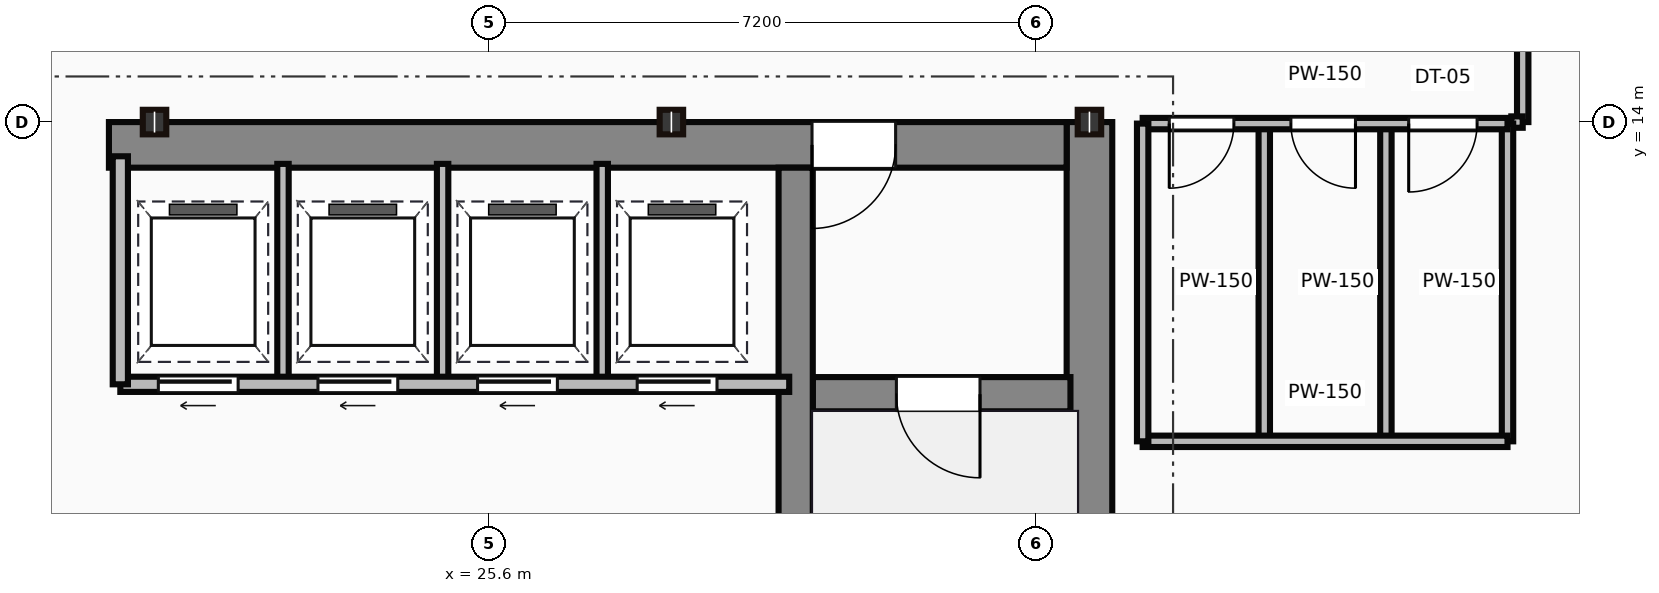
"""IFC4 building model, lengths in metres.
Left out: names, types, materials, properties, quantities, classifications, styles, units other than length and angle.
Written with IfcOpenShell. Run it as: python <this file> out.ifc"""

import sys

from ifc_helpers import new_model, si_unit, direction, frame, frame_2d, origin, origin_2d, place, context, subcontext, project, spatial, rectangle, i_section, extrude, source, transform, mapped, element, fill, save


model = new_model("IFC4")
c1 = context("Model", 3, precision=1e-05, world=origin(), true_north=direction((0.0, 1.0)))
c2 = subcontext(c1, "Body", "Model", "MODEL_VIEW")
j1 = project(units=[si_unit("LENGTHUNIT", "METRE"), si_unit("PLANEANGLEUNIT", "RADIAN")], contexts=[c1])
p1 = place(None, origin())
s1 = spatial("IfcSite", under=j1, at=p1, CompositionType="ELEMENT")
p2 = place(p1, origin())
s2 = spatial("IfcBuilding", under=s1, at=p2, CompositionType="ELEMENT")
p3 = place(p2, frame((0.0, 0.0, 206.85)))
s3 = spatial("IfcBuildingStorey", under=s2, at=p3, CompositionType="ELEMENT", Elevation=206.85)
m1 = source(origin(), c2, "Body", "SweptSolid", [
    extrude(rectangle(XDim=13.1, YDim=0.6, at=frame_2d((6.55, 0.0))), origin(), (0.0, 0.0, 1.0), 3.65),
])
p4 = place(p3, frame((33.5, 0.9, 0.0), z_axis=(0.0, 0.0, 1.0), x_axis=(0.0, 1.0, 0.0)))
e1 = element("IfcWall", 1, at=p4, inside=s3, PredefinedType="SHEAR", context=c2, shape_type="MappedRepresentation", body=[
    mapped(m1, transform((0.0, 0.0, 0.0))),
])
m2 = source(origin(), c2, "Body", "SweptSolid", [
    extrude(rectangle(XDim=12.6, YDim=0.6, at=frame_2d((6.3, 0.0))), origin(), (0.0, 0.0, 1.0), 3.65),
])
p5 = place(p3, frame((20.6, 13.7, 0.0), z_axis=(0.0, 0.0, 1.0), x_axis=(1.0, 0.0, 0.0)))
e2 = element("IfcWall", 2, at=p5, inside=s3, PredefinedType="SHEAR", context=c2, shape_type="MappedRepresentation", body=[
    mapped(m2, transform((0.0, 0.0, 0.0))),
])
p6 = place(p5, frame((9.25, 0.0, 0.0)))
e3 = element("IfcOpeningElement", 3, at=p6, cuts=e2, PredefinedType="OPENING", context=c2, shape_type="SweptSolid", body=[
    extrude(rectangle(XDim=1.1, YDim=2.15, at=frame_2d((0.55, 1.075))), frame((0.0, 0.31, 0.0), z_axis=(0.0, -1.0, 0.0), x_axis=(1.0, 0.0, 0.0)), (0.0, 0.0, 1.0), 0.62),
])
m3 = source(origin(), c2, "Body", "SweptSolid", [
    extrude(rectangle(XDim=12.5, YDim=0.45, at=frame_2d((6.25, 0.0))), origin(), (0.0, 0.0, 1.0), 3.65),
])
p7 = place(p3, frame((29.635, 0.9, 0.0), z_axis=(0.0, 0.0, 1.0), x_axis=(0.0, 1.0, 0.0)))
e4 = element("IfcWall", 4, at=p7, inside=s3, PredefinedType="SHEAR", context=c2, shape_type="MappedRepresentation", body=[
    mapped(m3, transform((0.0, 0.0, 0.0))),
])
m4 = source(origin(), c2, "Body", "SweptSolid", [
    extrude(rectangle(XDim=3.39, YDim=0.45, at=frame_2d((1.695, 0.0))), origin(), (0.0, 0.0, 1.0), 3.65),
])
p8 = place(p3, frame((29.86, 10.42, 0.0), z_axis=(0.0, 0.0, 1.0), x_axis=(1.0, 0.0, 0.0)))
e5 = element("IfcWall", 5, at=p8, inside=s3, PredefinedType="SHEAR", context=c2, shape_type="MappedRepresentation", body=[
    mapped(m4, transform((0.0, 0.0, 0.0))),
])
p9 = place(p8, frame((1.1, 0.0, 0.0)))
e6 = element("IfcOpeningElement", 6, at=p9, cuts=e5, PredefinedType="OPENING", context=c2, shape_type="SweptSolid", body=[
    extrude(rectangle(XDim=1.1, YDim=2.15, at=frame_2d((0.55, 1.075))), frame((0.0, 0.235, 0.0), z_axis=(0.0, -1.0, 0.0), x_axis=(1.0, 0.0, 0.0)), (0.0, 0.0, 1.0), 0.47),
])
m5 = source(origin(), c2, "Body", "SweptSolid", [
    extrude(i_section(OverallWidth=0.309, OverallDepth=0.323, WebThickness=0.014, FlangeThickness=0.023, at=origin_2d()), origin(), (0.0, 0.0, 1.0), 3.65),
])
for number, where, z_axis, x_axis in (
    (7, (21.2, 14.0, 0.0), (0.0, 0.0, 1.0), (1.0, 0.0, 0.0)),
    (8, (28.0, 14.0, 0.0), (0.0, 0.0, 1.0), (1.0, 0.0, 0.0)),
    (9, (33.5, 14.0, 0.0), (0.0, 0.0, 1.0), (1.0, 0.0, 0.0)),
):
    element("IfcColumn", number, at=place(p3, frame(where, z_axis=z_axis, x_axis=x_axis)), inside=s3, PredefinedType="COLUMN", context=c2, shape_type="MappedRepresentation", body=[
        mapped(m5, transform((0.0, 0.0, 0.0))),
    ])
m6 = source(origin(), c2, "Body", "SweptSolid", [
    extrude(rectangle(XDim=8.8, YDim=0.2, at=frame_2d((4.4, 0.0))), origin(), (0.0, 0.0, 1.0), 3.4),
])
p10 = place(p3, frame((20.75, 10.55, 0.0), z_axis=(0.0, 0.0, 1.0), x_axis=(1.0, 0.0, 0.0)))
e10 = element("IfcWall", 10, at=p10, inside=s3, PredefinedType="PARTITIONING", context=c2, shape_type="MappedRepresentation", body=[
    mapped(m6, transform((0.0, 0.0, 0.0))),
])
p11 = place(p10, frame((0.5, 0.0, 0.0)))
e11 = element("IfcOpeningElement", 11, at=p11, cuts=e10, PredefinedType="OPENING", context=c2, shape_type="SweptSolid", body=[
    extrude(rectangle(XDim=1.05, YDim=2.15, at=frame_2d((0.525, 1.075))), frame((0.0, 0.11, 0.0), z_axis=(0.0, -1.0, 0.0), x_axis=(1.0, 0.0, 0.0)), (0.0, 0.0, 1.0), 0.22),
])
p12 = place(p10, frame((2.6, 0.0, 0.0)))
e12 = element("IfcOpeningElement", 12, at=p12, cuts=e10, PredefinedType="OPENING", context=c2, shape_type="SweptSolid", body=[
    extrude(rectangle(XDim=1.05, YDim=2.15, at=frame_2d((0.525, 1.075))), frame((0.0, 0.11, 0.0), z_axis=(0.0, -1.0, 0.0), x_axis=(1.0, 0.0, 0.0)), (0.0, 0.0, 1.0), 0.22),
])
p13 = place(p10, frame((4.7, 0.0, 0.0)))
e13 = element("IfcOpeningElement", 13, at=p13, cuts=e10, PredefinedType="OPENING", context=c2, shape_type="SweptSolid", body=[
    extrude(rectangle(XDim=1.05, YDim=2.15, at=frame_2d((0.525, 1.075))), frame((0.0, 0.11, 0.0), z_axis=(0.0, -1.0, 0.0), x_axis=(1.0, 0.0, 0.0)), (0.0, 0.0, 1.0), 0.22),
])
p14 = place(p10, frame((6.8, 0.0, 0.0)))
e14 = element("IfcOpeningElement", 14, at=p14, cuts=e10, PredefinedType="OPENING", context=c2, shape_type="SweptSolid", body=[
    extrude(rectangle(XDim=1.05, YDim=2.15, at=frame_2d((0.525, 1.075))), frame((0.0, 0.11, 0.0), z_axis=(0.0, -1.0, 0.0), x_axis=(1.0, 0.0, 0.0)), (0.0, 0.0, 1.0), 0.22),
])
m7 = source(origin(), c2, "Body", "SweptSolid", [
    extrude(rectangle(XDim=3.0, YDim=0.2, at=frame_2d((1.5, 0.0))), origin(), (0.0, 0.0, 1.0), 3.4),
])
p15 = place(p3, frame((20.75, 10.55, 0.0), z_axis=(0.0, 0.0, 1.0), x_axis=(0.0, 1.0, 0.0)))
e15 = element("IfcWall", 15, at=p15, inside=s3, PredefinedType="PARTITIONING", context=c2, shape_type="MappedRepresentation", body=[
    mapped(m7, transform((0.0, 0.0, 0.0))),
])
m8 = source(origin(), c2, "Body", "SweptSolid", [
    extrude(rectangle(XDim=2.85, YDim=0.15, at=frame_2d((1.425, 0.0))), origin(), (0.0, 0.0, 1.0), 3.4),
])
for number, where, z_axis, x_axis in (
    (16, (22.89, 10.6, 0.0), (0.0, 0.0, 1.0), (0.0, 1.0, 0.0)),
    (17, (24.99, 10.6, 0.0), (0.0, 0.0, 1.0), (0.0, 1.0, 0.0)),
    (18, (27.09, 10.6, 0.0), (0.0, 0.0, 1.0), (0.0, 1.0, 0.0)),
):
    element("IfcWall", number, at=place(p3, frame(where, z_axis=z_axis, x_axis=x_axis)), inside=s3, PredefinedType="PARTITIONING", context=c2, shape_type="MappedRepresentation", body=[
        mapped(m8, transform((0.0, 0.0, 0.0))),
    ])
m9 = source(origin(), c2, "Body", "SweptSolid", [
    extrude(rectangle(XDim=4.8, YDim=0.15, at=frame_2d((2.4, 0.0))), origin(), (0.0, 0.0, 1.0), 2.787),
])
p16 = place(p3, frame((34.2, 13.98, 0.0), z_axis=(0.0, 0.0, 1.0), x_axis=(1.0, 0.0, 0.0)))
e19 = element("IfcWall", 19, at=p16, inside=s3, PredefinedType="PARTITIONING", context=c2, shape_type="MappedRepresentation", body=[
    mapped(m9, transform((0.0, 0.0, 0.0))),
])
p17 = place(p16, frame((0.35, 0.0, 0.0)))
e20 = element("IfcOpeningElement", 20, at=p17, cuts=e19, PredefinedType="OPENING", context=c2, shape_type="SweptSolid", body=[
    extrude(rectangle(XDim=0.85, YDim=2.1, at=frame_2d((0.425, 1.05))), frame((0.0, 0.085, 0.0), z_axis=(0.0, -1.0, 0.0), x_axis=(1.0, 0.0, 0.0)), (0.0, 0.0, 1.0), 0.17),
])
p18 = place(p16, frame((1.95, 0.0, 0.0)))
e21 = element("IfcOpeningElement", 21, at=p18, cuts=e19, PredefinedType="OPENING", context=c2, shape_type="SweptSolid", body=[
    extrude(rectangle(XDim=0.85, YDim=2.1, at=frame_2d((0.425, 1.05))), frame((0.0, 0.085, 0.0), z_axis=(0.0, -1.0, 0.0), x_axis=(1.0, 0.0, 0.0)), (0.0, 0.0, 1.0), 0.17),
])
p19 = place(p16, frame((3.5, 0.0, 0.0)))
e22 = element("IfcOpeningElement", 22, at=p19, cuts=e19, PredefinedType="OPENING", context=c2, shape_type="SweptSolid", body=[
    extrude(rectangle(XDim=0.9, YDim=2.1, at=frame_2d((0.45, 1.05))), frame((0.0, 0.085, 0.0), z_axis=(0.0, -1.0, 0.0), x_axis=(1.0, 0.0, 0.0)), (0.0, 0.0, 1.0), 0.17),
])
m10 = source(origin(), c2, "Body", "SweptSolid", [
    extrude(rectangle(XDim=4.8, YDim=0.15, at=frame_2d((2.4, 0.0))), origin(), (0.0, 0.0, 1.0), 3.4),
])
p20 = place(p3, frame((34.2, 9.8, 0.0), z_axis=(0.0, 0.0, 1.0), x_axis=(1.0, 0.0, 0.0)))
e23 = element("IfcWall", 23, at=p20, inside=s3, PredefinedType="PARTITIONING", context=c2, shape_type="MappedRepresentation", body=[
    mapped(m10, transform((0.0, 0.0, 0.0))),
])
m11 = source(origin(), c2, "Body", "SweptSolid", [
    extrude(rectangle(XDim=4.18, YDim=0.15, at=frame_2d((2.09, 0.0))), origin(), (0.0, 0.0, 1.0), 3.4),
])
for number, where, z_axis, x_axis in (
    (24, (39.0, 9.8, 0.0), (0.0, 0.0, 1.0), (0.0, 1.0, 0.0)),
    (25, (34.2, 9.8, 0.0), (0.0, 0.0, 1.0), (0.0, 1.0, 0.0)),
    (26, (35.8, 9.8, 0.0), (0.0, 0.0, 1.0), (0.0, 1.0, 0.0)),
    (27, (37.4, 9.8, 0.0), (0.0, 0.0, 1.0), (0.0, 1.0, 0.0)),
):
    element("IfcWall", number, at=place(p3, frame(where, z_axis=z_axis, x_axis=x_axis)), inside=s3, PredefinedType="PARTITIONING", context=c2, shape_type="MappedRepresentation", body=[
        mapped(m11, transform((0.0, 0.0, 0.0))),
    ])
m12 = source(origin(), c2, "Body", "SweptSolid", [
    extrude(rectangle(XDim=2.2, YDim=0.15, at=frame_2d((1.1, 0.0))), origin(), (0.0, 0.0, 1.0), 3.4),
])
p21 = place(p3, frame((39.2, 16.2, 0.0), z_axis=(0.0, 0.0, 1.0), x_axis=(0.0, -1.0, 0.0)))
e28 = element("IfcWall", 28, at=p21, inside=s3, PredefinedType="PARTITIONING", context=c2, shape_type="MappedRepresentation", body=[
    mapped(m12, transform((0.0, 0.0, 0.0))),
])
m13 = source(origin(), c2, "Body", "SweptSolid", [
    extrude(rectangle(XDim=0.15, YDim=0.15, at=frame_2d((0.075, 0.0))), origin(), (0.0, 0.0, 1.0), 3.4),
])
p22 = place(p3, frame((39.2, 14.0, 0.0), z_axis=(0.0, 0.0, 1.0), x_axis=(-1.0, 0.0, 0.0)))
e29 = element("IfcWall", 29, at=p22, inside=s3, PredefinedType="PARTITIONING", context=c2, shape_type="MappedRepresentation", body=[
    mapped(m13, transform((0.0, 0.0, 0.0))),
])
m14 = source(origin(), c2, "Body", "SweptSolid", [
    extrude(rectangle(XDim=1.1, YDim=2.15, at=frame_2d((0.55, 1.075))), frame((0.0, 0.025, 0.0), z_axis=(0.0, -1.0, 0.0), x_axis=(1.0, 0.0, 0.0)), (0.0, 0.0, 1.0), 0.05),
])
p23 = place(p9, frame((1.1, 0.0, 0.0), z_axis=(0.0, 0.0, 1.0), x_axis=(-1.0, 0.0, 0.0)))
e30 = element("IfcDoor", 30, at=p23, inside=s3, OperationType="SINGLE_SWING_RIGHT", PredefinedType="DOOR", context=c2, shape_type="MappedRepresentation", body=[
    mapped(m14, transform((0.0, 0.0, 0.0))),
])
fill(e6, e30)
p24 = place(p6, origin())
e31 = element("IfcDoor", 31, at=p24, inside=s3, OperationType="SINGLE_SWING_LEFT", PredefinedType="DOOR", context=c2, shape_type="MappedRepresentation", body=[
    mapped(m14, transform((0.0, 0.0, 0.0))),
])
fill(e3, e31)
m15 = source(origin(), c2, "Body", "SweptSolid", [
    extrude(rectangle(XDim=1.05, YDim=2.15, at=frame_2d((0.525, 1.075))), frame((0.0, 0.025, 0.0), z_axis=(0.0, -1.0, 0.0), x_axis=(1.0, 0.0, 0.0)), (0.0, 0.0, 1.0), 0.05),
])
p25 = place(p11, frame((1.05, 0.0, 0.0), z_axis=(0.0, 0.0, 1.0), x_axis=(-1.0, 0.0, 0.0)))
e32 = element("IfcDoor", 32, at=p25, inside=s3, OperationType="SLIDING_TO_LEFT", PredefinedType="DOOR", context=c2, shape_type="MappedRepresentation", body=[
    mapped(m15, transform((0.0, 0.0, 0.0))),
])
fill(e11, e32)
p26 = place(p12, frame((1.05, 0.0, 0.0), z_axis=(0.0, 0.0, 1.0), x_axis=(-1.0, 0.0, 0.0)))
e33 = element("IfcDoor", 33, at=p26, inside=s3, OperationType="SLIDING_TO_LEFT", PredefinedType="DOOR", context=c2, shape_type="MappedRepresentation", body=[
    mapped(m15, transform((0.0, 0.0, 0.0))),
])
fill(e12, e33)
p27 = place(p13, frame((1.05, 0.0, 0.0), z_axis=(0.0, 0.0, 1.0), x_axis=(-1.0, 0.0, 0.0)))
e34 = element("IfcDoor", 34, at=p27, inside=s3, OperationType="SLIDING_TO_LEFT", PredefinedType="DOOR", context=c2, shape_type="MappedRepresentation", body=[
    mapped(m15, transform((0.0, 0.0, 0.0))),
])
fill(e13, e34)
p28 = place(p14, frame((1.05, 0.0, 0.0), z_axis=(0.0, 0.0, 1.0), x_axis=(-1.0, 0.0, 0.0)))
e35 = element("IfcDoor", 35, at=p28, inside=s3, OperationType="SLIDING_TO_LEFT", PredefinedType="DOOR", context=c2, shape_type="MappedRepresentation", body=[
    mapped(m15, transform((0.0, 0.0, 0.0))),
])
fill(e14, e35)
m16 = source(origin(), c2, "Body", "SweptSolid", [
    extrude(rectangle(XDim=0.85, YDim=2.1, at=frame_2d((0.425, 1.05))), frame((0.0, 0.025, 0.0), z_axis=(0.0, -1.0, 0.0), x_axis=(1.0, 0.0, 0.0)), (0.0, 0.0, 1.0), 0.05),
])
p29 = place(p17, frame((0.85, 0.0, 0.0), z_axis=(0.0, 0.0, 1.0), x_axis=(-1.0, 0.0, 0.0)))
e36 = element("IfcDoor", 36, at=p29, inside=s3, OperationType="SINGLE_SWING_LEFT", PredefinedType="DOOR", context=c2, shape_type="MappedRepresentation", body=[
    mapped(m16, transform((0.0, 0.0, 0.0))),
])
fill(e20, e36)
p30 = place(p18, frame((0.85, 0.0, 0.0), z_axis=(0.0, 0.0, 1.0), x_axis=(-1.0, 0.0, 0.0)))
e37 = element("IfcDoor", 37, at=p30, inside=s3, OperationType="SINGLE_SWING_RIGHT", PredefinedType="DOOR", context=c2, shape_type="MappedRepresentation", body=[
    mapped(m16, transform((0.0, 0.0, 0.0))),
])
fill(e21, e37)
m17 = source(origin(), c2, "Body", "SweptSolid", [
    extrude(rectangle(XDim=0.9, YDim=2.1, at=frame_2d((0.45, 1.05))), frame((0.0, 0.025, 0.0), z_axis=(0.0, -1.0, 0.0), x_axis=(1.0, 0.0, 0.0)), (0.0, 0.0, 1.0), 0.05),
])
p31 = place(p19, frame((0.9, 0.0, 0.0), z_axis=(0.0, 0.0, 1.0), x_axis=(-1.0, 0.0, 0.0)))
e38 = element("IfcDoor", 38, at=p31, inside=s3, OperationType="SINGLE_SWING_LEFT", PredefinedType="DOOR", context=c2, shape_type="MappedRepresentation", body=[
    mapped(m17, transform((0.0, 0.0, 0.0))),
])
fill(e22, e38)
save(model, sys.argv[1])
